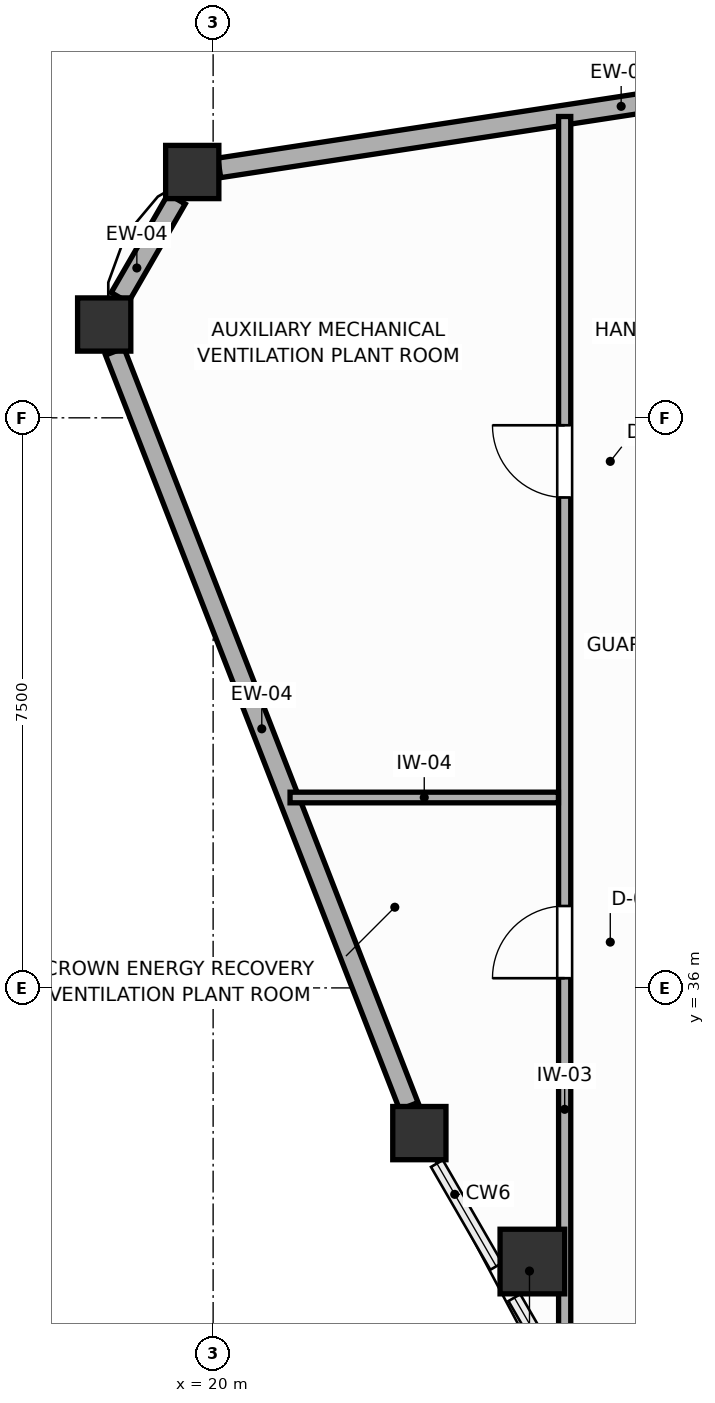
"""IFC4 building model, lengths in metres.
Left out: names, types, materials, properties, quantities, classifications, styles, units other than length and angle.
Written with IfcOpenShell. Run it as: python <this file> out.ifc"""

import sys

from ifc_helpers import new_model, si_unit, direction, frame, frame_2d, origin, origin_2d, place, context, subcontext, project, spatial, rectangle, extrude, source, transform, mapped, element, fill, save


model = new_model("IFC4")
c1 = context("Model", 3, precision=1e-05, world=origin(), true_north=direction((0.0, 1.0)))
c2 = subcontext(c1, "Body", "Model", "MODEL_VIEW")
j1 = project(units=[si_unit("LENGTHUNIT", "METRE"), si_unit("PLANEANGLEUNIT", "RADIAN")], contexts=[c1])
p1 = place(None, origin())
s1 = spatial("IfcSite", under=j1, at=p1, CompositionType="ELEMENT")
p2 = place(p1, origin())
s2 = spatial("IfcBuilding", under=s1, at=p2, CompositionType="ELEMENT")
p3 = place(p2, frame((0.0, 0.0, 292.2)))
s3 = spatial("IfcBuildingStorey", under=s2, at=p3, CompositionType="ELEMENT", Elevation=292.2)
m1 = source(origin(), c2, "Body", "SweptSolid", [
    extrude(rectangle(XDim=0.85, YDim=0.85, at=origin_2d()), origin(), (0.0, 0.0, 1.0), 3.9),
])
p4 = place(p3, frame((24.2, 32.4, 0.0), z_axis=(0.0, 0.0, 1.0), x_axis=(1.0, 0.0, 0.0)))
e1 = element("IfcColumn", 1, at=p4, inside=s3, PredefinedType="COLUMN", context=c2, shape_type="MappedRepresentation", body=[
    mapped(m1, transform((0.0, 0.0, 0.0), scale=1.0)),
])
m2 = source(origin(), c2, "Body", "SweptSolid", [
    extrude(rectangle(XDim=0.7, YDim=0.7, at=origin_2d()), origin(), (0.0, 0.0, 1.0), 3.9),
])
for number, where, z_axis, x_axis in (
    (2, (19.725, 46.734, 0.0), (0.0, 0.0, 1.0), (1.0, 0.0, 0.0)),
    (3, (18.567, 44.727, 0.0), (0.0, 0.0, 1.0), (1.0, 0.0, 0.0)),
    (4, (22.713, 34.09, 0.0), (0.0, 0.0, 1.0), (1.0, 0.0, 0.0)),
):
    element("IfcColumn", number, at=place(p3, frame(where, z_axis=z_axis, x_axis=x_axis)), inside=s3, PredefinedType="COLUMN", context=c2, shape_type="MappedRepresentation", body=[
        mapped(m2, transform((0.0, 0.0, 0.0), scale=1.0)),
    ])
p5 = place(p3, frame((30.656, 48.407, 0.0), z_axis=(0.0, 0.0, 1.0), x_axis=(-0.988478819852, -0.151359250475, 0.0)))
e5 = element("IfcWall", 5, at=p5, inside=s3, PredefinedType="SOLIDWALL", context=c2, shape_type="SweptSolid", body=[
    extrude(rectangle(XDim=10.699, YDim=0.26, at=frame_2d((5.35, 0.0))), origin(), (0.0, 0.0, 1.0), 2.05),
])
p6 = place(p3, frame((19.52, 46.379, 0.0), z_axis=(0.0, 0.0, 1.0), x_axis=(-0.499910707084, -0.866076950936, 0.0)))
e6 = element("IfcWall", 6, at=p6, inside=s3, PredefinedType="SOLIDWALL", context=c2, shape_type="SweptSolid", body=[
    extrude(rectangle(XDim=1.497, YDim=0.26, at=frame_2d((0.749, 0.0))), origin(), (0.0, 0.0, 1.0), 2.05),
])
p7 = place(p3, frame((18.705, 44.372, 0.0), z_axis=(0.0, 0.0, 1.0), x_axis=(0.363147184015, -0.931731786912, 0.0)))
e7 = element("IfcWall", 7, at=p7, inside=s3, PredefinedType="SOLIDWALL", context=c2, shape_type="SweptSolid", body=[
    extrude(rectangle(XDim=10.655, YDim=0.26, at=frame_2d((5.328, 0.0))), origin(), (0.0, 0.0, 1.0), 2.05),
])
p8 = place(p3, frame((24.625, 30.798, 0.0), z_axis=(0.0, 0.0, 1.0), x_axis=(0.0, 1.0, 0.0)))
e8 = element("IfcWall", 8, at=p8, inside=s3, PredefinedType="PARTITIONING", context=c2, shape_type="SweptSolid", body=[
    extrude(rectangle(XDim=16.666, YDim=0.16, at=frame_2d((8.333, 0.0))), origin(), (0.0, 0.0, 1.0), 3.65),
])
p9 = place(p8, frame((5.329, 0.0, 0.0)))
e9 = element("IfcOpeningElement", 9, at=p9, cuts=e8, PredefinedType="OPENING", context=c2, shape_type="SweptSolid", body=[
    extrude(rectangle(XDim=0.95, YDim=2.05, at=frame_2d((0.475, 1.025))), frame((0.0, 0.09, 0.0), z_axis=(0.0, -1.0, 0.0), x_axis=(1.0, 0.0, 0.0)), (0.0, 0.0, 1.0), 0.18),
])
p10 = place(p8, frame((11.654, 0.0, 0.0)))
e10 = element("IfcOpeningElement", 10, at=p10, cuts=e8, PredefinedType="OPENING", context=c2, shape_type="SweptSolid", body=[
    extrude(rectangle(XDim=0.95, YDim=2.05, at=frame_2d((0.475, 1.025))), frame((0.0, 0.09, 0.0), z_axis=(0.0, -1.0, 0.0), x_axis=(1.0, 0.0, 0.0)), (0.0, 0.0, 1.0), 0.18),
])
p11 = place(p3, frame((23.781, 32.275, 0.0), z_axis=(0.0, 0.0, 1.0), x_axis=(1.0, 0.0, 0.0)))
e11 = element("IfcWall", 11, at=p11, inside=s3, PredefinedType="PARTITIONING", context=c2, shape_type="SweptSolid", body=[
    extrude(rectangle(XDim=0.762, YDim=0.16, at=frame_2d((0.381, 0.0))), origin(), (0.0, 0.0, 1.0), 3.65),
])
p12 = place(p3, frame((21.012, 38.505, 0.0), z_axis=(0.0, 0.0, 1.0), x_axis=(1.0, 0.0, 0.0)))
e12 = element("IfcWall", 12, at=p12, inside=s3, PredefinedType="PARTITIONING", context=c2, shape_type="SweptSolid", body=[
    extrude(rectangle(XDim=3.531, YDim=0.14, at=frame_2d((1.765, 0.0))), origin(), (0.0, 0.0, 1.0), 3.65),
])
p13 = place(p9, origin())
e13 = element("IfcDoor", 13, at=p13, inside=s3, OperationType="SINGLE_SWING_LEFT", PredefinedType="DOOR", context=c2, shape_type="SweptSolid", body=[
    extrude(rectangle(XDim=0.95, YDim=2.05, at=frame_2d((0.475, 1.025))), frame((0.0, 0.025, 0.0), z_axis=(0.0, -1.0, 0.0), x_axis=(1.0, 0.0, 0.0)), (0.0, 0.0, 1.0), 0.05),
])
fill(e9, e13)
p14 = place(p10, origin())
e14 = element("IfcDoor", 14, at=p14, inside=s3, OperationType="SINGLE_SWING_RIGHT", PredefinedType="DOOR", context=c2, shape_type="SweptSolid", body=[
    extrude(rectangle(XDim=0.95, YDim=2.05, at=frame_2d((0.475, 1.025))), frame((0.0, 0.025, 0.0), z_axis=(0.0, -1.0, 0.0), x_axis=(1.0, 0.0, 0.0)), (0.0, 0.0, 1.0), 0.05),
])
fill(e10, e14)
save(model, sys.argv[1])
